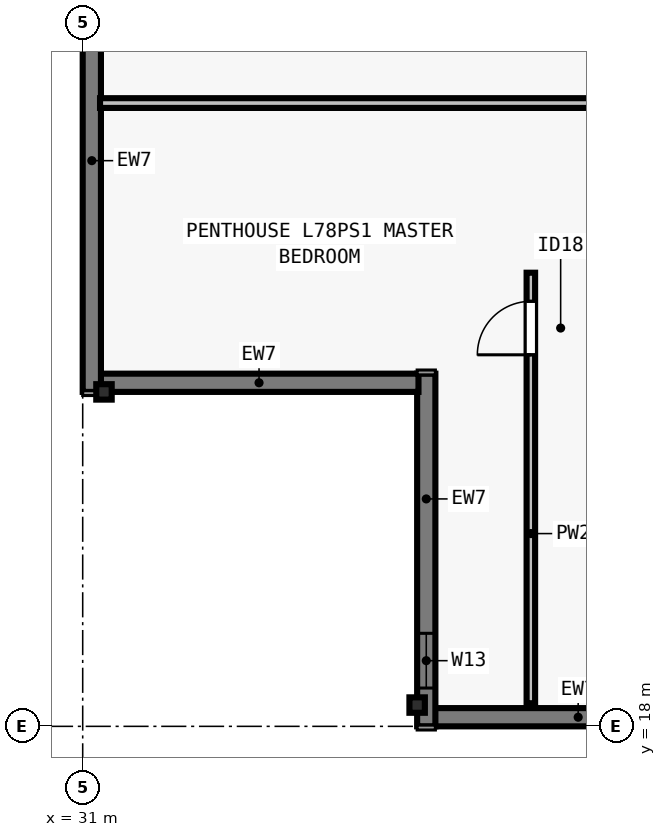
"""IFC4 building model, lengths in metres.
Left out: names, types, materials, properties, quantities, classifications, styles, units other than length and angle.
Written with IfcOpenShell. Run it as: python <this file> out.ifc"""

import sys

from ifc_helpers import new_model, si_unit, direction, frame, frame_2d, origin, origin_2d, place, context, subcontext, project, spatial, rectangle, i_section, extrude, element, fill, save


model = new_model("IFC4")
c1 = context("Model", 3, precision=1e-05, world=origin(), true_north=direction((0.0, 1.0)))
c2 = subcontext(c1, "Body", "Model", "MODEL_VIEW")
j1 = project(units=[si_unit("LENGTHUNIT", "METRE"), si_unit("PLANEANGLEUNIT", "RADIAN")], contexts=[c1])
p1 = place(None, origin())
s1 = spatial("IfcSite", under=j1, at=p1, CompositionType="ELEMENT")
p2 = place(p1, origin())
s2 = spatial("IfcBuilding", under=s1, at=p2, CompositionType="ELEMENT")
p3 = place(p2, frame((0.0, 0.0, 284.0)))
s3 = spatial("IfcBuildingStorey", under=s2, at=p3, CompositionType="ELEMENT", Elevation=284.0)
for number, where, z_axis, x_axis in (
    (1, (36.5, 18.35, 0.0), (0.0, 0.0, 1.0), (1.0, 0.0, 0.0)),
    (2, (31.35, 23.5, 0.0), (0.0, 0.0, 1.0), (0.0, 1.0, 0.0)),
):
    element("IfcColumn", number, at=place(p3, frame(where, z_axis=z_axis, x_axis=x_axis)), inside=s3, PredefinedType="COLUMN", context=c2, shape_type="SweptSolid", body=[
        extrude(i_section(OverallWidth=0.254, OverallDepth=0.254, WebThickness=0.009, FlangeThickness=0.014, FilletRadius=0.013, at=origin_2d()), origin(), (0.0, 0.0, 1.0), 3.5),
    ])
p4 = place(p3, frame((58.2, 18.15, 0.0), z_axis=(0.0, 0.0, 1.0), x_axis=(-1.0, 0.0, 0.0)))
e3 = element("IfcWall", 3, at=p4, inside=s3, PredefinedType="SOLIDWALL", context=c2, shape_type="SweptSolid", body=[
    extrude(rectangle(XDim=21.422, YDim=0.3, at=frame_2d((10.711, 0.0))), origin(), (0.0, 0.0, 1.0), 3.29),
])
p5 = place(p4, frame((2.465, 0.0, 0.8)))
e4 = element("IfcOpeningElement", 4, at=p5, cuts=e3, PredefinedType="OPENING", context=c2, shape_type="SweptSolid", body=[
    extrude(rectangle(XDim=1.65, YDim=1.758, at=frame_2d((0.825, 0.879))), frame((0.0, 0.16, 0.0), z_axis=(0.0, -1.0, 0.0), x_axis=(1.0, 0.0, 0.0)), (0.0, 0.0, 1.0), 0.32),
])
p6 = place(p4, frame((6.371, 0.0, 0.8)))
e5 = element("IfcOpeningElement", 5, at=p6, cuts=e3, PredefinedType="OPENING", context=c2, shape_type="SweptSolid", body=[
    extrude(rectangle(XDim=2.0, YDim=1.758, at=frame_2d((1.0, 0.879))), frame((0.0, 0.16, 0.0), z_axis=(0.0, -1.0, 0.0), x_axis=(1.0, 0.0, 0.0)), (0.0, 0.0, 1.0), 0.32),
])
p7 = place(p4, frame((11.876, 0.0, 0.8)))
e6 = element("IfcOpeningElement", 6, at=p7, cuts=e3, PredefinedType="OPENING", context=c2, shape_type="SweptSolid", body=[
    extrude(rectangle(XDim=1.65, YDim=1.758, at=frame_2d((0.825, 0.879))), frame((0.0, 0.16, 0.0), z_axis=(0.0, -1.0, 0.0), x_axis=(1.0, 0.0, 0.0)), (0.0, 0.0, 1.0), 0.32),
])
p8 = place(p4, frame((14.532, 0.0, 0.8)))
e7 = element("IfcOpeningElement", 7, at=p8, cuts=e3, PredefinedType="OPENING", context=c2, shape_type="SweptSolid", body=[
    extrude(rectangle(XDim=2.0, YDim=1.758, at=frame_2d((1.0, 0.879))), frame((0.0, 0.16, 0.0), z_axis=(0.0, -1.0, 0.0), x_axis=(1.0, 0.0, 0.0)), (0.0, 0.0, 1.0), 0.32),
])
p9 = place(p3, frame((36.65, 18.0, 0.0), z_axis=(0.0, 0.0, 1.0), x_axis=(0.0, 1.0, 0.0)))
e8 = element("IfcWall", 8, at=p9, inside=s3, PredefinedType="SOLIDWALL", context=c2, shape_type="SweptSolid", body=[
    extrude(rectangle(XDim=5.8, YDim=0.3, at=frame_2d((2.9, 0.0))), origin(), (0.0, 0.0, 1.0), 3.29),
])
p10 = place(p9, frame((0.63, 0.0, 0.8)))
e9 = element("IfcOpeningElement", 9, at=p10, cuts=e8, PredefinedType="OPENING", context=c2, shape_type="SweptSolid", body=[
    extrude(rectangle(XDim=0.9, YDim=1.75, at=frame_2d((0.45, 0.875))), frame((0.0, 0.16, 0.0), z_axis=(0.0, -1.0, 0.0), x_axis=(1.0, 0.0, 0.0)), (0.0, 0.0, 1.0), 0.32),
])
p11 = place(p3, frame((36.522, 23.65, 0.0), z_axis=(0.0, 0.0, 1.0), x_axis=(-1.0, 0.0, 0.0)))
e10 = element("IfcWall", 10, at=p11, inside=s3, PredefinedType="SOLIDWALL", context=c2, shape_type="SweptSolid", body=[
    extrude(rectangle(XDim=5.244, YDim=0.3, at=frame_2d((2.622, 0.0))), origin(), (0.0, 0.0, 1.0), 3.29),
])
p12 = place(p3, frame((31.15, 23.5, 0.0), z_axis=(0.0, 0.0, 1.0), x_axis=(0.0, 1.0, 0.0)))
e11 = element("IfcWall", 11, at=p12, inside=s3, PredefinedType="SOLIDWALL", context=c2, shape_type="SweptSolid", body=[
    extrude(rectangle(XDim=30.722, YDim=0.3, at=frame_2d((15.361, 0.0))), origin(), (0.0, 0.0, 1.0), 3.29),
])
p13 = place(p12, frame((7.756, 0.0, 0.8)))
e12 = element("IfcOpeningElement", 12, at=p13, cuts=e11, PredefinedType="OPENING", context=c2, shape_type="SweptSolid", body=[
    extrude(rectangle(XDim=2.0, YDim=1.758, at=frame_2d((1.0, 0.879))), frame((0.0, 0.16, 0.0), z_axis=(0.0, -1.0, 0.0), x_axis=(1.0, 0.0, 0.0)), (0.0, 0.0, 1.0), 0.32),
])
p14 = place(p12, frame((12.617, 0.0, 0.8)))
e13 = element("IfcOpeningElement", 13, at=p14, cuts=e11, PredefinedType="OPENING", context=c2, shape_type="SweptSolid", body=[
    extrude(rectangle(XDim=1.65, YDim=1.758, at=frame_2d((0.825, 0.879))), frame((0.0, 0.16, 0.0), z_axis=(0.0, -1.0, 0.0), x_axis=(1.0, 0.0, 0.0)), (0.0, 0.0, 1.0), 0.32),
])
p15 = place(p12, frame((17.53, 0.0, 0.8)))
e14 = element("IfcOpeningElement", 14, at=p15, cuts=e11, PredefinedType="OPENING", context=c2, shape_type="SweptSolid", body=[
    extrude(rectangle(XDim=2.0, YDim=1.758, at=frame_2d((1.0, 0.879))), frame((0.0, 0.16, 0.0), z_axis=(0.0, -1.0, 0.0), x_axis=(1.0, 0.0, 0.0)), (0.0, 0.0, 1.0), 0.32),
])
p16 = place(p12, frame((21.142, 0.0, 0.8)))
e15 = element("IfcOpeningElement", 15, at=p16, cuts=e11, PredefinedType="OPENING", context=c2, shape_type="SweptSolid", body=[
    extrude(rectangle(XDim=1.65, YDim=1.758, at=frame_2d((0.825, 0.879))), frame((0.0, 0.16, 0.0), z_axis=(0.0, -1.0, 0.0), x_axis=(1.0, 0.0, 0.0)), (0.0, 0.0, 1.0), 0.32),
])
p17 = place(p12, frame((26.63, 0.0, 0.8)))
e16 = element("IfcOpeningElement", 16, at=p17, cuts=e11, PredefinedType="OPENING", context=c2, shape_type="SweptSolid", body=[
    extrude(rectangle(XDim=0.9, YDim=1.75, at=frame_2d((0.45, 0.875))), frame((0.0, 0.16, 0.0), z_axis=(0.0, -1.0, 0.0), x_axis=(1.0, 0.0, 0.0)), (0.0, 0.0, 1.0), 0.32),
])
p18 = place(p3, frame((31.285, 28.25, 0.0), z_axis=(0.0, 0.0, 1.0), x_axis=(1.0, 0.0, 0.0)))
e17 = element("IfcWall", 17, at=p18, inside=s3, PredefinedType="PARTITIONING", context=c2, shape_type="SweptSolid", body=[
    extrude(rectangle(XDim=41.43, YDim=0.16, at=frame_2d((20.715, 0.0))), origin(), (0.0, 0.0, 1.0), 3.009),
])
p19 = place(p18, frame((20.235, 0.0, 0.0)))
e18 = element("IfcOpeningElement", 18, at=p19, cuts=e17, PredefinedType="OPENING", context=c2, shape_type="SweptSolid", body=[
    extrude(rectangle(XDim=0.96, YDim=2.18, at=frame_2d((0.48, 1.09))), frame((0.0, 0.09, 0.0), z_axis=(0.0, -1.0, 0.0), x_axis=(1.0, 0.0, 0.0)), (0.0, 0.0, 1.0), 0.18),
])
p20 = place(p3, frame((38.37, 18.38, 0.0), z_axis=(0.0, 0.0, 1.0), x_axis=(0.0, 1.0, 0.0)))
e19 = element("IfcWall", 19, at=p20, inside=s3, PredefinedType="PARTITIONING", context=c2, shape_type="SweptSolid", body=[
    extrude(rectangle(XDim=7.08, YDim=0.14, at=frame_2d((3.54, 0.0))), origin(), (0.0, 0.0, 1.0), 2.653),
])
p21 = place(p20, frame((5.73, 0.0, 0.0)))
e20 = element("IfcOpeningElement", 20, at=p21, cuts=e19, PredefinedType="OPENING", context=c2, shape_type="SweptSolid", body=[
    extrude(rectangle(XDim=0.88, YDim=2.1, at=frame_2d((0.44, 1.05))), frame((0.0, 0.08, 0.0), z_axis=(0.0, -1.0, 0.0), x_axis=(1.0, 0.0, 0.0)), (0.0, 0.0, 1.0), 0.16),
])
p22 = place(p10, origin())
e21 = element("IfcWindow", 21, at=p22, inside=s3, PartitioningType="SINGLE_PANEL", PredefinedType="WINDOW", context=c2, shape_type="SweptSolid", body=[
    extrude(rectangle(XDim=0.9, YDim=1.75, at=frame_2d((0.45, 0.875))), frame((0.0, -0.04, 0.0), z_axis=(0.0, -1.0, 0.0), x_axis=(1.0, 0.0, 0.0)), (0.0, 0.0, 1.0), 0.06),
])
fill(e9, e21)
p23 = place(p21, origin())
e22 = element("IfcDoor", 22, at=p23, inside=s3, OperationType="SINGLE_SWING_LEFT", PredefinedType="DOOR", context=c2, shape_type="SweptSolid", body=[
    extrude(rectangle(XDim=0.88, YDim=2.1, at=frame_2d((0.44, 1.05))), frame((0.0, 0.025, 0.0), z_axis=(0.0, -1.0, 0.0), x_axis=(1.0, 0.0, 0.0)), (0.0, 0.0, 1.0), 0.05),
])
fill(e20, e22)
save(model, sys.argv[1])
